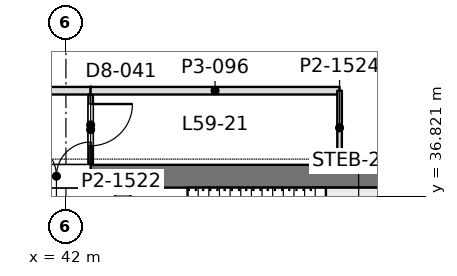
"""IFC4 building model, lengths in metres.
Left out: names, types, materials, properties, quantities, classifications, styles, units other than length and angle.
Written with IfcOpenShell. Run it as: python <this file> out.ifc"""

import sys

from ifc_helpers import new_model, si_unit, direction, frame, frame_2d, origin, place, context, subcontext, project, spatial, rectangle, extrude, element, fill, save


model = new_model("IFC4")
c1 = context("Model", 3, precision=1e-05, world=origin(), true_north=direction((0.0, 1.0)))
c2 = subcontext(c1, "Body", "Model", "MODEL_VIEW")
j1 = project(units=[si_unit("LENGTHUNIT", "METRE"), si_unit("PLANEANGLEUNIT", "RADIAN")], contexts=[c1])
p1 = place(None, origin())
s1 = spatial("IfcSite", under=j1, at=p1, CompositionType="ELEMENT")
p2 = place(p1, origin())
s2 = spatial("IfcBuilding", under=s1, at=p2, CompositionType="ELEMENT")
p3 = place(p2, frame((0.0, 0.0, 259.2)))
s3 = spatial("IfcBuildingStorey", under=s2, at=p3, CompositionType="ELEMENT", Elevation=259.2)
p4 = place(p3, frame((33.75, 37.35, 0.0), z_axis=(0.0, 0.0, 1.0), x_axis=(1.0, 0.0, 0.0)))
e1 = element("IfcWall", 1, at=p4, inside=s3, PredefinedType="SHEAR", context=c2, shape_type="SweptSolid", body=[
    extrude(rectangle(XDim=17.7, YDim=0.6, at=frame_2d((8.85, 0.0))), origin(), (0.0, 0.0, 1.0), 4.5),
])
p5 = place(p4, frame((7.1, 0.0, 0.0)))
e2 = element("IfcOpeningElement", 2, at=p5, cuts=e1, PredefinedType="OPENING", context=c2, shape_type="SweptSolid", body=[
    extrude(rectangle(XDim=1.8, YDim=2.4, at=frame_2d((0.9, 1.2))), frame((0.0, 0.31, 0.0), z_axis=(0.0, -1.0, 0.0), x_axis=(1.0, 0.0, 0.0)), (0.0, 0.0, 1.0), 0.62),
])
p6 = place(p3, frame((43.5, 13.05, 0.0), z_axis=(0.0, 0.0, 1.0), x_axis=(0.0, 1.0, 0.0)))
e3 = element("IfcWall", 3, at=p6, inside=s3, PredefinedType="SHEAR", context=c2, shape_type="SweptSolid", body=[
    extrude(rectangle(XDim=24.3, YDim=0.4, at=frame_2d((12.15, 0.0))), origin(), (0.0, 0.0, 1.0), 4.5),
])
p7 = place(p6, frame((1.3, 0.0, 0.0)))
e4 = element("IfcOpeningElement", 4, at=p7, cuts=e3, PredefinedType="OPENING", context=c2, shape_type="SweptSolid", body=[
    extrude(rectangle(XDim=1.0, YDim=2.2, at=frame_2d((0.5, 1.1))), frame((0.0, 0.21, 0.0), z_axis=(0.0, -1.0, 0.0), x_axis=(1.0, 0.0, 0.0)), (0.0, 0.0, 1.0), 0.42),
])
p8 = place(p6, frame((22.0, 0.0, 0.0)))
e5 = element("IfcOpeningElement", 5, at=p8, cuts=e3, PredefinedType="OPENING", context=c2, shape_type="SweptSolid", body=[
    extrude(rectangle(XDim=1.0, YDim=2.2, at=frame_2d((0.5, 1.1))), frame((0.0, 0.21, 0.0), z_axis=(0.0, -1.0, 0.0), x_axis=(1.0, 0.0, 0.0)), (0.0, 0.0, 1.0), 0.42),
])
p9 = place(p6, frame((5.55, 0.0, 0.0)))
e6 = element("IfcOpeningElement", 6, at=p9, cuts=e3, PredefinedType="OPENING", context=c2, shape_type="SweptSolid", body=[
    extrude(rectangle(XDim=1.0, YDim=2.2, at=frame_2d((0.5, 1.1))), frame((0.0, 0.21, 0.0), z_axis=(0.0, -1.0, 0.0), x_axis=(1.0, 0.0, 0.0)), (0.0, 0.0, 1.0), 0.42),
])
p10 = place(p6, frame((9.55, 0.0, 0.0)))
e7 = element("IfcOpeningElement", 7, at=p10, cuts=e3, PredefinedType="OPENING", context=c2, shape_type="SweptSolid", body=[
    extrude(rectangle(XDim=1.0, YDim=2.2, at=frame_2d((0.5, 1.1))), frame((0.0, 0.21, 0.0), z_axis=(0.0, -1.0, 0.0), x_axis=(1.0, 0.0, 0.0)), (0.0, 0.0, 1.0), 0.42),
])
p11 = place(p6, frame((12.8, 0.0, 0.0)))
e8 = element("IfcOpeningElement", 8, at=p11, cuts=e3, PredefinedType="OPENING", context=c2, shape_type="SweptSolid", body=[
    extrude(rectangle(XDim=1.1, YDim=2.2, at=frame_2d((0.55, 1.1))), frame((0.0, 0.21, 0.0), z_axis=(0.0, -1.0, 0.0), x_axis=(1.0, 0.0, 0.0)), (0.0, 0.0, 1.0), 0.42),
])
p12 = place(p6, frame((15.538, 0.0, 0.0)))
e9 = element("IfcOpeningElement", 9, at=p12, cuts=e3, PredefinedType="OPENING", context=c2, shape_type="SweptSolid", body=[
    extrude(rectangle(XDim=1.1, YDim=2.2, at=frame_2d((0.55, 1.1))), frame((0.0, 0.21, 0.0), z_axis=(0.0, -1.0, 0.0), x_axis=(1.0, 0.0, 0.0)), (0.0, 0.0, 1.0), 0.42),
])
p13 = place(p6, frame((18.262, 0.0, 0.0)))
e10 = element("IfcOpeningElement", 10, at=p13, cuts=e3, PredefinedType="OPENING", context=c2, shape_type="SweptSolid", body=[
    extrude(rectangle(XDim=1.1, YDim=2.2, at=frame_2d((0.55, 1.1))), frame((0.0, 0.21, 0.0), z_axis=(0.0, -1.0, 0.0), x_axis=(1.0, 0.0, 0.0)), (0.0, 0.0, 1.0), 0.42),
])
p14 = place(p3, frame((1.2, 39.6, 0.0), z_axis=(0.0, 0.0, 1.0), x_axis=(1.0, 0.0, 0.0)))
e11 = element("IfcWall", 11, at=p14, inside=s3, PredefinedType="PARTITIONING", context=c2, shape_type="SweptSolid", body=[
    extrude(rectangle(XDim=41.452, YDim=0.2, at=frame_2d((20.726, 0.0))), origin(), (0.0, 0.0, 1.0), 3.8),
])
p15 = place(p14, frame((4.3, 0.0, 0.0)))
e12 = element("IfcOpeningElement", 12, at=p15, cuts=e11, PredefinedType="OPENING", context=c2, shape_type="SweptSolid", body=[
    extrude(rectangle(XDim=1.8, YDim=2.2, at=frame_2d((0.9, 1.1))), frame((0.0, 0.11, 0.0), z_axis=(0.0, -1.0, 0.0), x_axis=(1.0, 0.0, 0.0)), (0.0, 0.0, 1.0), 0.22),
])
p16 = place(p14, frame((9.5, 0.0, 0.0)))
e13 = element("IfcOpeningElement", 13, at=p16, cuts=e11, PredefinedType="OPENING", context=c2, shape_type="SweptSolid", body=[
    extrude(rectangle(XDim=1.8, YDim=2.2, at=frame_2d((0.9, 1.1))), frame((0.0, 0.11, 0.0), z_axis=(0.0, -1.0, 0.0), x_axis=(1.0, 0.0, 0.0)), (0.0, 0.0, 1.0), 0.22),
])
p17 = place(p14, frame((20.3, 0.0, 0.0)))
e14 = element("IfcOpeningElement", 14, at=p17, cuts=e11, PredefinedType="OPENING", context=c2, shape_type="SweptSolid", body=[
    extrude(rectangle(XDim=1.8, YDim=2.2, at=frame_2d((0.9, 1.1))), frame((0.0, 0.11, 0.0), z_axis=(0.0, -1.0, 0.0), x_axis=(1.0, 0.0, 0.0)), (0.0, 0.0, 1.0), 0.22),
])
p18 = place(p14, frame((25.9, 0.0, 0.0)))
e15 = element("IfcOpeningElement", 15, at=p18, cuts=e11, PredefinedType="OPENING", context=c2, shape_type="SweptSolid", body=[
    extrude(rectangle(XDim=1.8, YDim=2.2, at=frame_2d((0.9, 1.1))), frame((0.0, 0.11, 0.0), z_axis=(0.0, -1.0, 0.0), x_axis=(1.0, 0.0, 0.0)), (0.0, 0.0, 1.0), 0.22),
])
p19 = place(p14, frame((34.517, 0.0, 0.0)))
e16 = element("IfcOpeningElement", 16, at=p19, cuts=e11, PredefinedType="OPENING", context=c2, shape_type="SweptSolid", body=[
    extrude(rectangle(XDim=1.8, YDim=2.2, at=frame_2d((0.9, 1.1))), frame((0.0, 0.11, 0.0), z_axis=(0.0, -1.0, 0.0), x_axis=(1.0, 0.0, 0.0)), (0.0, 0.0, 1.0), 0.22),
])
p20 = place(p14, frame((37.533, 0.0, 0.0)))
e17 = element("IfcOpeningElement", 17, at=p20, cuts=e11, PredefinedType="OPENING", context=c2, shape_type="SweptSolid", body=[
    extrude(rectangle(XDim=1.8, YDim=2.2, at=frame_2d((0.9, 1.1))), frame((0.0, 0.11, 0.0), z_axis=(0.0, -1.0, 0.0), x_axis=(1.0, 0.0, 0.0)), (0.0, 0.0, 1.0), 0.22),
])
p21 = place(p3, frame((42.65, 37.648, 0.0), z_axis=(0.0, 0.0, 1.0), x_axis=(0.0, 1.0, 0.0)))
e18 = element("IfcWall", 18, at=p21, inside=s3, PredefinedType="PARTITIONING", context=c2, shape_type="SweptSolid", body=[
    extrude(rectangle(XDim=1.854, YDim=0.12, at=frame_2d((0.927, 0.0))), origin(), (0.0, 0.0, 1.0), 4.35),
])
p22 = place(p21, frame((0.502, 0.0, 0.0)))
e19 = element("IfcOpeningElement", 19, at=p22, cuts=e18, PredefinedType="OPENING", context=c2, shape_type="SweptSolid", body=[
    extrude(rectangle(XDim=1.1, YDim=2.4, at=frame_2d((0.55, 1.2))), frame((0.0, 0.07, 0.0), z_axis=(0.0, -1.0, 0.0), x_axis=(1.0, 0.0, 0.0)), (0.0, 0.0, 1.0), 0.14),
])
p23 = place(p3, frame((42.648, 39.6, 0.0), z_axis=(0.0, 0.0, 1.0), x_axis=(1.0, 0.0, 0.0)))
e20 = element("IfcWall", 20, at=p23, inside=s3, PredefinedType="PARTITIONING", context=c2, shape_type="SweptSolid", body=[
    extrude(rectangle(XDim=6.552, YDim=0.2, at=frame_2d((3.276, 0.0))), origin(), (0.0, 0.0, 1.0), 3.99),
])
p24 = place(p3, frame((49.2, 37.648, 0.0), z_axis=(0.0, 0.0, 1.0), x_axis=(0.0, 1.0, 0.0)))
e21 = element("IfcWall", 21, at=p24, inside=s3, PredefinedType="PARTITIONING", context=c2, shape_type="SweptSolid", body=[
    extrude(rectangle(XDim=1.952, YDim=0.12, at=frame_2d((0.976, 0.0))), origin(), (0.0, 0.0, 1.0), 4.35),
])
p25 = place(p5, origin())
e22 = element("IfcDoor", 22, at=p25, inside=s3, OperationType="DOUBLE_DOOR_SINGLE_SWING", PredefinedType="DOOR", context=c2, shape_type="SweptSolid", body=[
    extrude(rectangle(XDim=1.8, YDim=2.4, at=frame_2d((0.9, 1.2))), frame((0.0, 0.025, 0.0), z_axis=(0.0, -1.0, 0.0), x_axis=(1.0, 0.0, 0.0)), (0.0, 0.0, 1.0), 0.05),
])
fill(e2, e22)
p26 = place(p22, frame((1.1, 0.0, 0.0), z_axis=(0.0, 0.0, 1.0), x_axis=(-1.0, 0.0, 0.0)))
e23 = element("IfcDoor", 23, at=p26, inside=s3, OperationType="SINGLE_SWING_LEFT", PredefinedType="DOOR", context=c2, shape_type="SweptSolid", body=[
    extrude(rectangle(XDim=1.1, YDim=2.4, at=frame_2d((0.55, 1.2))), frame((0.0, 0.025, 0.0), z_axis=(0.0, -1.0, 0.0), x_axis=(1.0, 0.0, 0.0)), (0.0, 0.0, 1.0), 0.05),
])
fill(e19, e23)
save(model, sys.argv[1])
